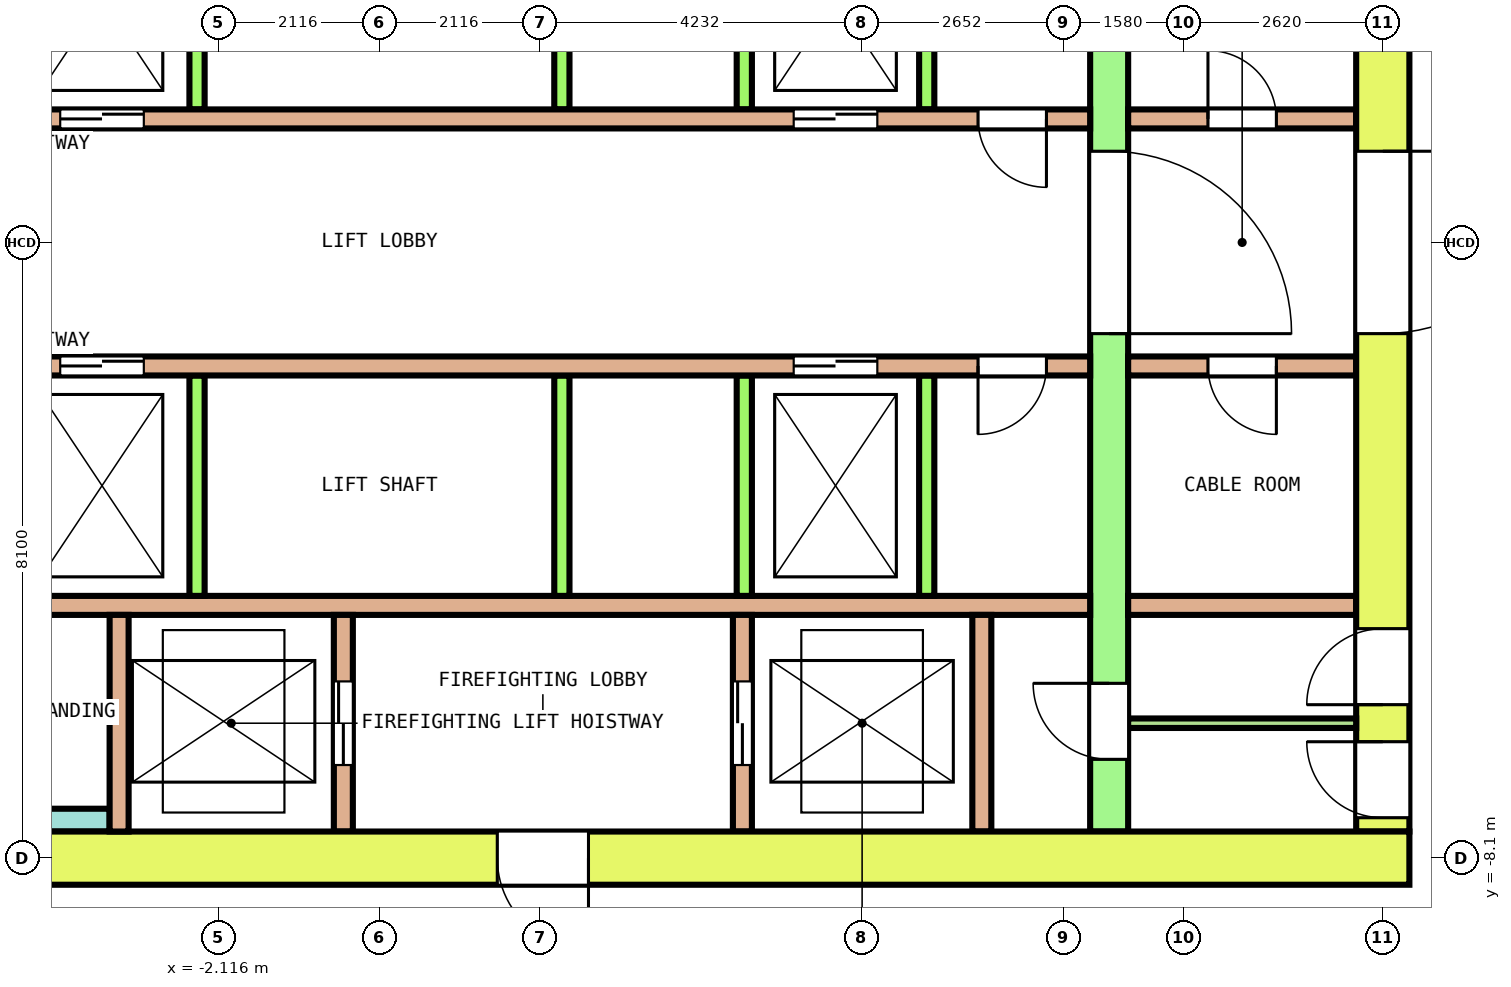
"""IFC4 building model, lengths in metres.
Left out: names, types, materials, properties, quantities, classifications, styles, units other than length and angle.
Written with IfcOpenShell. Run it as: python <this file> out.ifc"""

import sys

from ifc_helpers import new_model, si_unit, direction, frame, frame_2d, origin, place, context, subcontext, project, spatial, rectangle, extrude, element, fill, save


model = new_model("IFC4")
c1 = context("Model", 3, precision=1e-05, world=origin(), true_north=direction((0.0, 1.0)))
c2 = subcontext(c1, "Body", "Model", "MODEL_VIEW")
j1 = project(units=[si_unit("LENGTHUNIT", "METRE"), si_unit("PLANEANGLEUNIT", "RADIAN")], contexts=[c1])
p1 = place(None, origin())
s1 = spatial("IfcSite", under=j1, at=p1, CompositionType="ELEMENT")
p2 = place(p1, origin())
s2 = spatial("IfcBuilding", under=s1, at=p2, CompositionType="ELEMENT")
p3 = place(p2, frame((0.0, 0.0, 193.6)))
s3 = spatial("IfcBuildingStorey", under=s2, at=p3, CompositionType="ELEMENT", Elevation=193.6)
p4 = place(p3, frame((-13.55, -8.1, 0.0), z_axis=(0.0, 0.0, 1.0), x_axis=(1.0, 0.0, 0.0)))
e1 = element("IfcWall", 1, at=p4, inside=s3, PredefinedType="SHEAR", context=c2, shape_type="SweptSolid", body=[
    extrude(rectangle(XDim=27.1, YDim=0.7, at=frame_2d((13.55, 0.0))), origin(), (0.0, 0.0, 1.0), 4.1),
])
p5 = place(p4, frame((15.1, 0.0, 0.0)))
e2 = element("IfcOpeningElement", 2, at=p5, cuts=e1, PredefinedType="OPENING", context=c2, shape_type="SweptSolid", body=[
    extrude(rectangle(XDim=1.2, YDim=2.1, at=frame_2d((0.6, 1.05))), frame((0.0, 0.36, 0.0), z_axis=(0.0, -1.0, 0.0), x_axis=(1.0, 0.0, 0.0)), (0.0, 0.0, 1.0), 0.72),
])
p6 = place(p3, frame((13.2, -7.75, 0.0), z_axis=(0.0, 0.0, 1.0), x_axis=(0.0, 1.0, 0.0)))
e3 = element("IfcWall", 3, at=p6, inside=s3, PredefinedType="SHEAR", context=c2, shape_type="SweptSolid", body=[
    extrude(rectangle(XDim=15.5, YDim=0.7, at=frame_2d((7.75, 0.0))), origin(), (0.0, 0.0, 1.0), 4.1),
])
p7 = place(p6, frame((6.55, 0.0, 0.0)))
e4 = element("IfcOpeningElement", 4, at=p7, cuts=e3, PredefinedType="OPENING", context=c2, shape_type="SweptSolid", body=[
    extrude(rectangle(XDim=2.4, YDim=2.1, at=frame_2d((1.2, 1.05))), frame((0.0, 0.36, 0.0), z_axis=(0.0, -1.0, 0.0), x_axis=(1.0, 0.0, 0.0)), (0.0, 0.0, 1.0), 0.72),
])
p8 = place(p6, frame((13.45, 0.0, 0.0)))
e5 = element("IfcOpeningElement", 5, at=p8, cuts=e3, PredefinedType="OPENING", context=c2, shape_type="SweptSolid", body=[
    extrude(rectangle(XDim=1.2, YDim=2.1, at=frame_2d((0.6, 1.05))), frame((0.0, 0.36, 0.0), z_axis=(0.0, -1.0, 0.0), x_axis=(1.0, 0.0, 0.0)), (0.0, 0.0, 1.0), 0.72),
])
p9 = place(p6, frame((0.181, 0.0, 0.0)))
e6 = element("IfcOpeningElement", 6, at=p9, cuts=e3, PredefinedType="OPENING", context=c2, shape_type="SweptSolid", body=[
    extrude(rectangle(XDim=1.0, YDim=2.1, at=frame_2d((0.5, 1.05))), frame((0.0, 0.36, 0.0), z_axis=(0.0, -1.0, 0.0), x_axis=(1.0, 0.0, 0.0)), (0.0, 0.0, 1.0), 0.72),
])
p10 = place(p6, frame((1.669, 0.0, 0.0)))
e7 = element("IfcOpeningElement", 7, at=p10, cuts=e3, PredefinedType="OPENING", context=c2, shape_type="SweptSolid", body=[
    extrude(rectangle(XDim=1.0, YDim=2.1, at=frame_2d((0.5, 1.05))), frame((0.0, 0.36, 0.0), z_axis=(0.0, -1.0, 0.0), x_axis=(1.0, 0.0, 0.0)), (0.0, 0.0, 1.0), 0.72),
])
p11 = place(p3, frame((9.6, -7.75, 0.0), z_axis=(0.0, 0.0, 1.0), x_axis=(0.0, 1.0, 0.0)))
e8 = element("IfcWall", 8, at=p11, inside=s3, PredefinedType="SHEAR", context=c2, shape_type="SweptSolid", body=[
    extrude(rectangle(XDim=15.5, YDim=0.5, at=frame_2d((7.75, 0.0))), origin(), (0.0, 0.0, 1.0), 4.1),
])
p12 = place(p11, frame((6.55, 0.0, 0.0)))
e9 = element("IfcOpeningElement", 9, at=p12, cuts=e8, PredefinedType="OPENING", context=c2, shape_type="SweptSolid", body=[
    extrude(rectangle(XDim=2.4, YDim=2.1, at=frame_2d((1.2, 1.05))), frame((0.0, 0.26, 0.0), z_axis=(0.0, -1.0, 0.0), x_axis=(1.0, 0.0, 0.0)), (0.0, 0.0, 1.0), 0.52),
])
p13 = place(p11, frame((13.45, 0.0, 0.0)))
e10 = element("IfcOpeningElement", 10, at=p13, cuts=e8, PredefinedType="OPENING", context=c2, shape_type="SweptSolid", body=[
    extrude(rectangle(XDim=1.2, YDim=2.1, at=frame_2d((0.6, 1.05))), frame((0.0, 0.26, 0.0), z_axis=(0.0, -1.0, 0.0), x_axis=(1.0, 0.0, 0.0)), (0.0, 0.0, 1.0), 0.52),
])
p14 = place(p11, frame((0.95, 0.0, 0.0)))
e11 = element("IfcOpeningElement", 11, at=p14, cuts=e8, PredefinedType="OPENING", context=c2, shape_type="SweptSolid", body=[
    extrude(rectangle(XDim=1.0, YDim=2.1, at=frame_2d((0.5, 1.05))), frame((0.0, 0.26, 0.0), z_axis=(0.0, -1.0, 0.0), x_axis=(1.0, 0.0, 0.0)), (0.0, 0.0, 1.0), 0.52),
])
p15 = place(p3, frame((-9.35, 1.625, 0.0), z_axis=(0.0, 0.0, 1.0), x_axis=(1.0, 0.0, 0.0)))
e12 = element("IfcWall", 12, at=p15, inside=s3, PredefinedType="SOLIDWALL", context=c2, shape_type="SweptSolid", body=[
    extrude(rectangle(XDim=18.7, YDim=0.25, at=frame_2d((9.35, 0.0))), origin(), (0.0, 0.0, 1.0), 4.1),
])
p16 = place(p15, frame((2.85, 0.0, 0.0)))
e13 = element("IfcOpeningElement", 13, at=p16, cuts=e12, PredefinedType="OPENING", context=c2, shape_type="SweptSolid", body=[
    extrude(rectangle(XDim=1.1, YDim=2.1, at=frame_2d((0.55, 1.05))), frame((0.0, 0.135, 0.0), z_axis=(0.0, -1.0, 0.0), x_axis=(1.0, 0.0, 0.0)), (0.0, 0.0, 1.0), 0.27),
])
p17 = place(p15, frame((5.15, 0.0, 0.0)))
e14 = element("IfcOpeningElement", 14, at=p17, cuts=e12, PredefinedType="OPENING", context=c2, shape_type="SweptSolid", body=[
    extrude(rectangle(XDim=1.1, YDim=2.1, at=frame_2d((0.55, 1.05))), frame((0.0, 0.135, 0.0), z_axis=(0.0, -1.0, 0.0), x_axis=(1.0, 0.0, 0.0)), (0.0, 0.0, 1.0), 0.27),
])
p18 = place(p15, frame((14.8, 0.0, 0.0)))
e15 = element("IfcOpeningElement", 15, at=p18, cuts=e12, PredefinedType="OPENING", context=c2, shape_type="SweptSolid", body=[
    extrude(rectangle(XDim=1.1, YDim=2.1, at=frame_2d((0.55, 1.05))), frame((0.0, 0.135, 0.0), z_axis=(0.0, -1.0, 0.0), x_axis=(1.0, 0.0, 0.0)), (0.0, 0.0, 1.0), 0.27),
])
p19 = place(p15, frame((0.575, 0.0, 0.0)))
e16 = element("IfcOpeningElement", 16, at=p19, cuts=e12, PredefinedType="OPENING", context=c2, shape_type="SweptSolid", body=[
    extrude(rectangle(XDim=0.9, YDim=2.1, at=frame_2d((0.45, 1.05))), frame((0.0, 0.135, 0.0), z_axis=(0.0, -1.0, 0.0), x_axis=(1.0, 0.0, 0.0)), (0.0, 0.0, 1.0), 0.27),
])
p20 = place(p15, frame((17.225, 0.0, 0.0)))
e17 = element("IfcOpeningElement", 17, at=p20, cuts=e12, PredefinedType="OPENING", context=c2, shape_type="SweptSolid", body=[
    extrude(rectangle(XDim=0.9, YDim=2.1, at=frame_2d((0.45, 1.05))), frame((0.0, 0.135, 0.0), z_axis=(0.0, -1.0, 0.0), x_axis=(1.0, 0.0, 0.0)), (0.0, 0.0, 1.0), 0.27),
])
p21 = place(p3, frame((9.85, 1.625, 0.0), z_axis=(0.0, 0.0, 1.0), x_axis=(1.0, 0.0, 0.0)))
e18 = element("IfcWall", 18, at=p21, inside=s3, PredefinedType="SOLIDWALL", context=c2, shape_type="SweptSolid", body=[
    extrude(rectangle(XDim=3.0, YDim=0.25, at=frame_2d((1.5, 0.0))), origin(), (0.0, 0.0, 1.0), 4.1),
])
p22 = place(p21, frame((1.05, 0.0, 0.0)))
e19 = element("IfcOpeningElement", 19, at=p22, cuts=e18, PredefinedType="OPENING", context=c2, shape_type="SweptSolid", body=[
    extrude(rectangle(XDim=0.9, YDim=2.1, at=frame_2d((0.45, 1.05))), frame((0.0, 0.135, 0.0), z_axis=(0.0, -1.0, 0.0), x_axis=(1.0, 0.0, 0.0)), (0.0, 0.0, 1.0), 0.27),
])
for number, where, z_axis, x_axis in (
    (20, (-2.4, 1.75, 0.0), (0.0, 0.0, 1.0), (0.0, 1.0, 0.0)),
    (21, (2.4, 1.75, 0.0), (0.0, 0.0, 1.0), (0.0, 1.0, 0.0)),
    (22, (4.8, 1.75, 0.0), (0.0, 0.0, 1.0), (0.0, 1.0, 0.0)),
    (23, (7.2, 1.75, 0.0), (0.0, 0.0, 1.0), (0.0, 1.0, 0.0)),
):
    element("IfcWall", number, at=place(p3, frame(where, z_axis=z_axis, x_axis=x_axis)), inside=s3, PredefinedType="SOLIDWALL", context=c2, shape_type="SweptSolid", body=[
        extrude(rectangle(XDim=2.9, YDim=0.2, at=frame_2d((1.45, 0.0))), origin(), (0.0, 0.0, 1.0), 4.1),
    ])
p23 = place(p3, frame((-9.35, -1.625, 0.0), z_axis=(0.0, 0.0, 1.0), x_axis=(1.0, 0.0, 0.0)))
e24 = element("IfcWall", 24, at=p23, inside=s3, PredefinedType="SOLIDWALL", context=c2, shape_type="SweptSolid", body=[
    extrude(rectangle(XDim=18.7, YDim=0.25, at=frame_2d((9.35, 0.0))), origin(), (0.0, 0.0, 1.0), 4.1),
])
p24 = place(p23, frame((2.85, 0.0, 0.0)))
e25 = element("IfcOpeningElement", 25, at=p24, cuts=e24, PredefinedType="OPENING", context=c2, shape_type="SweptSolid", body=[
    extrude(rectangle(XDim=1.1, YDim=2.1, at=frame_2d((0.55, 1.05))), frame((0.0, 0.135, 0.0), z_axis=(0.0, -1.0, 0.0), x_axis=(1.0, 0.0, 0.0)), (0.0, 0.0, 1.0), 0.27),
])
p25 = place(p23, frame((5.15, 0.0, 0.0)))
e26 = element("IfcOpeningElement", 26, at=p25, cuts=e24, PredefinedType="OPENING", context=c2, shape_type="SweptSolid", body=[
    extrude(rectangle(XDim=1.1, YDim=2.1, at=frame_2d((0.55, 1.05))), frame((0.0, 0.135, 0.0), z_axis=(0.0, -1.0, 0.0), x_axis=(1.0, 0.0, 0.0)), (0.0, 0.0, 1.0), 0.27),
])
p26 = place(p23, frame((14.8, 0.0, 0.0)))
e27 = element("IfcOpeningElement", 27, at=p26, cuts=e24, PredefinedType="OPENING", context=c2, shape_type="SweptSolid", body=[
    extrude(rectangle(XDim=1.1, YDim=2.1, at=frame_2d((0.55, 1.05))), frame((0.0, 0.135, 0.0), z_axis=(0.0, -1.0, 0.0), x_axis=(1.0, 0.0, 0.0)), (0.0, 0.0, 1.0), 0.27),
])
p27 = place(p23, frame((0.575, 0.0, 0.0)))
e28 = element("IfcOpeningElement", 28, at=p27, cuts=e24, PredefinedType="OPENING", context=c2, shape_type="SweptSolid", body=[
    extrude(rectangle(XDim=0.9, YDim=2.1, at=frame_2d((0.45, 1.05))), frame((0.0, 0.135, 0.0), z_axis=(0.0, -1.0, 0.0), x_axis=(1.0, 0.0, 0.0)), (0.0, 0.0, 1.0), 0.27),
])
p28 = place(p23, frame((17.225, 0.0, 0.0)))
e29 = element("IfcOpeningElement", 29, at=p28, cuts=e24, PredefinedType="OPENING", context=c2, shape_type="SweptSolid", body=[
    extrude(rectangle(XDim=0.9, YDim=2.1, at=frame_2d((0.45, 1.05))), frame((0.0, 0.135, 0.0), z_axis=(0.0, -1.0, 0.0), x_axis=(1.0, 0.0, 0.0)), (0.0, 0.0, 1.0), 0.27),
])
p29 = place(p3, frame((9.85, -1.625, 0.0), z_axis=(0.0, 0.0, 1.0), x_axis=(1.0, 0.0, 0.0)))
e30 = element("IfcWall", 30, at=p29, inside=s3, PredefinedType="SOLIDWALL", context=c2, shape_type="SweptSolid", body=[
    extrude(rectangle(XDim=3.0, YDim=0.25, at=frame_2d((1.5, 0.0))), origin(), (0.0, 0.0, 1.0), 4.1),
])
p30 = place(p29, frame((1.05, 0.0, 0.0)))
e31 = element("IfcOpeningElement", 31, at=p30, cuts=e30, PredefinedType="OPENING", context=c2, shape_type="SweptSolid", body=[
    extrude(rectangle(XDim=0.9, YDim=2.1, at=frame_2d((0.45, 1.05))), frame((0.0, 0.135, 0.0), z_axis=(0.0, -1.0, 0.0), x_axis=(1.0, 0.0, 0.0)), (0.0, 0.0, 1.0), 0.27),
])
p31 = place(p3, frame((-9.35, -4.775, 0.0), z_axis=(0.0, 0.0, 1.0), x_axis=(1.0, 0.0, 0.0)))
e32 = element("IfcWall", 32, at=p31, inside=s3, PredefinedType="SOLIDWALL", context=c2, shape_type="SweptSolid", body=[
    extrude(rectangle(XDim=18.7, YDim=0.25, at=frame_2d((9.35, 0.0))), origin(), (0.0, 0.0, 1.0), 4.1),
])
p32 = place(p3, frame((9.85, -4.775, 0.0), z_axis=(0.0, 0.0, 1.0), x_axis=(1.0, 0.0, 0.0)))
e33 = element("IfcWall", 33, at=p32, inside=s3, PredefinedType="SOLIDWALL", context=c2, shape_type="SweptSolid", body=[
    extrude(rectangle(XDim=3.0, YDim=0.25, at=frame_2d((1.5, 0.0))), origin(), (0.0, 0.0, 1.0), 4.1),
])
for number, where, z_axis, x_axis in (
    (34, (-2.4, -4.65, 0.0), (0.0, 0.0, 1.0), (0.0, 1.0, 0.0)),
    (35, (2.4, -4.65, 0.0), (0.0, 0.0, 1.0), (0.0, 1.0, 0.0)),
    (36, (4.8, -4.65, 0.0), (0.0, 0.0, 1.0), (0.0, 1.0, 0.0)),
    (37, (7.2, -4.65, 0.0), (0.0, 0.0, 1.0), (0.0, 1.0, 0.0)),
):
    element("IfcWall", number, at=place(p3, frame(where, z_axis=z_axis, x_axis=x_axis)), inside=s3, PredefinedType="SOLIDWALL", context=c2, shape_type="SweptSolid", body=[
        extrude(rectangle(XDim=2.9, YDim=0.2, at=frame_2d((1.45, 0.0))), origin(), (0.0, 0.0, 1.0), 4.1),
    ])
p33 = place(p3, frame((-9.35, -7.6, 0.0), z_axis=(0.0, 0.0, 1.0), x_axis=(1.0, 0.0, 0.0)))
e38 = element("IfcWall", 38, at=p33, inside=s3, PredefinedType="SOLIDWALL", context=c2, shape_type="SweptSolid", body=[
    extrude(rectangle(XDim=5.8, YDim=0.3, at=frame_2d((2.9, 0.0))), origin(), (0.0, 0.0, 1.0), 4.1),
])
p34 = place(p3, frame((-3.425, -7.75, 0.0), z_axis=(0.0, 0.0, 1.0), x_axis=(0.0, 1.0, 0.0)))
e39 = element("IfcWall", 39, at=p34, inside=s3, PredefinedType="SOLIDWALL", context=c2, shape_type="SweptSolid", body=[
    extrude(rectangle(XDim=2.85, YDim=0.25, at=frame_2d((1.425, 0.0))), origin(), (0.0, 0.0, 1.0), 4.1),
])
p35 = place(p3, frame((-0.475, -7.75, 0.0), z_axis=(0.0, 0.0, 1.0), x_axis=(0.0, 1.0, 0.0)))
e40 = element("IfcWall", 40, at=p35, inside=s3, PredefinedType="SOLIDWALL", context=c2, shape_type="SweptSolid", body=[
    extrude(rectangle(XDim=2.85, YDim=0.25, at=frame_2d((1.425, 0.0))), origin(), (0.0, 0.0, 1.0), 4.1),
])
p36 = place(p35, frame((0.875, 0.0, 0.0)))
e41 = element("IfcOpeningElement", 41, at=p36, cuts=e40, PredefinedType="OPENING", context=c2, shape_type="SweptSolid", body=[
    extrude(rectangle(XDim=1.1, YDim=2.1, at=frame_2d((0.55, 1.05))), frame((0.0, 0.135, 0.0), z_axis=(0.0, -1.0, 0.0), x_axis=(1.0, 0.0, 0.0)), (0.0, 0.0, 1.0), 0.27),
])
p37 = place(p3, frame((4.775, -7.75, 0.0), z_axis=(0.0, 0.0, 1.0), x_axis=(0.0, 1.0, 0.0)))
e42 = element("IfcWall", 42, at=p37, inside=s3, PredefinedType="SOLIDWALL", context=c2, shape_type="SweptSolid", body=[
    extrude(rectangle(XDim=2.85, YDim=0.25, at=frame_2d((1.425, 0.0))), origin(), (0.0, 0.0, 1.0), 4.1),
])
p38 = place(p37, frame((0.875, 0.0, 0.0)))
e43 = element("IfcOpeningElement", 43, at=p38, cuts=e42, PredefinedType="OPENING", context=c2, shape_type="SweptSolid", body=[
    extrude(rectangle(XDim=1.1, YDim=2.1, at=frame_2d((0.55, 1.05))), frame((0.0, 0.135, 0.0), z_axis=(0.0, -1.0, 0.0), x_axis=(1.0, 0.0, 0.0)), (0.0, 0.0, 1.0), 0.27),
])
p39 = place(p3, frame((7.925, -7.75, 0.0), z_axis=(0.0, 0.0, 1.0), x_axis=(0.0, 1.0, 0.0)))
e44 = element("IfcWall", 44, at=p39, inside=s3, PredefinedType="SOLIDWALL", context=c2, shape_type="SweptSolid", body=[
    extrude(rectangle(XDim=2.85, YDim=0.25, at=frame_2d((1.425, 0.0))), origin(), (0.0, 0.0, 1.0), 4.1),
])
p40 = place(p3, frame((9.85, -6.325, 0.0), z_axis=(0.0, 0.0, 1.0), x_axis=(1.0, 0.0, 0.0)))
e45 = element("IfcWall", 45, at=p40, inside=s3, PredefinedType="PARTITIONING", context=c2, shape_type="SweptSolid", body=[
    extrude(rectangle(XDim=3.0, YDim=0.125, at=frame_2d((1.5, 0.0))), origin(), (0.0, 0.0, 1.0), 4.1),
])
p41 = place(p17, origin())
e46 = element("IfcDoor", 46, at=p41, inside=s3, OperationType="DOUBLE_DOOR_SLIDING", PredefinedType="DOOR", context=c2, shape_type="SweptSolid", body=[
    extrude(rectangle(XDim=1.1, YDim=2.1, at=frame_2d((0.55, 1.05))), frame((0.0, 0.075, 0.0), z_axis=(0.0, -1.0, 0.0), x_axis=(1.0, 0.0, 0.0)), (0.0, 0.0, 1.0), 0.15),
])
fill(e14, e46)
p42 = place(p18, origin())
e47 = element("IfcDoor", 47, at=p42, inside=s3, OperationType="DOUBLE_DOOR_SLIDING", PredefinedType="DOOR", context=c2, shape_type="SweptSolid", body=[
    extrude(rectangle(XDim=1.1, YDim=2.1, at=frame_2d((0.55, 1.05))), frame((0.0, 0.075, 0.0), z_axis=(0.0, -1.0, 0.0), x_axis=(1.0, 0.0, 0.0)), (0.0, 0.0, 1.0), 0.15),
])
fill(e15, e47)
p43 = place(p25, origin())
e48 = element("IfcDoor", 48, at=p43, inside=s3, OperationType="DOUBLE_DOOR_SLIDING", PredefinedType="DOOR", context=c2, shape_type="SweptSolid", body=[
    extrude(rectangle(XDim=1.1, YDim=2.1, at=frame_2d((0.55, 1.05))), frame((0.0, 0.075, 0.0), z_axis=(0.0, -1.0, 0.0), x_axis=(1.0, 0.0, 0.0)), (0.0, 0.0, 1.0), 0.15),
])
fill(e26, e48)
p44 = place(p26, origin())
e49 = element("IfcDoor", 49, at=p44, inside=s3, OperationType="DOUBLE_DOOR_SLIDING", PredefinedType="DOOR", context=c2, shape_type="SweptSolid", body=[
    extrude(rectangle(XDim=1.1, YDim=2.1, at=frame_2d((0.55, 1.05))), frame((0.0, 0.075, 0.0), z_axis=(0.0, -1.0, 0.0), x_axis=(1.0, 0.0, 0.0)), (0.0, 0.0, 1.0), 0.15),
])
fill(e27, e49)
p45 = place(p36, origin())
e50 = element("IfcDoor", 50, at=p45, inside=s3, OperationType="DOUBLE_DOOR_SLIDING", PredefinedType="DOOR", context=c2, shape_type="SweptSolid", body=[
    extrude(rectangle(XDim=1.1, YDim=2.1, at=frame_2d((0.55, 1.05))), frame((0.0, 0.075, 0.0), z_axis=(0.0, -1.0, 0.0), x_axis=(1.0, 0.0, 0.0)), (0.0, 0.0, 1.0), 0.15),
])
fill(e41, e50)
p46 = place(p38, origin())
e51 = element("IfcDoor", 51, at=p46, inside=s3, OperationType="DOUBLE_DOOR_SLIDING", PredefinedType="DOOR", context=c2, shape_type="SweptSolid", body=[
    extrude(rectangle(XDim=1.1, YDim=2.1, at=frame_2d((0.55, 1.05))), frame((0.0, 0.075, 0.0), z_axis=(0.0, -1.0, 0.0), x_axis=(1.0, 0.0, 0.0)), (0.0, 0.0, 1.0), 0.15),
])
fill(e43, e51)
p47 = place(p12, origin())
e52 = element("IfcDoor", 52, at=p47, inside=s3, OperationType="DOUBLE_DOOR_SINGLE_SWING", PredefinedType="DOOR", context=c2, shape_type="SweptSolid", body=[
    extrude(rectangle(XDim=2.4, YDim=2.1, at=frame_2d((1.2, 1.05))), frame((0.0, 0.2, 0.0), z_axis=(0.0, -1.0, 0.0), x_axis=(1.0, 0.0, 0.0)), (0.0, 0.0, 1.0), 0.4),
])
fill(e9, e52)
p48 = place(p7, origin())
e53 = element("IfcDoor", 53, at=p48, inside=s3, OperationType="DOUBLE_DOOR_SINGLE_SWING", PredefinedType="DOOR", context=c2, shape_type="SweptSolid", body=[
    extrude(rectangle(XDim=2.4, YDim=2.1, at=frame_2d((1.2, 1.05))), frame((0.0, 0.3, 0.0), z_axis=(0.0, -1.0, 0.0), x_axis=(1.0, 0.0, 0.0)), (0.0, 0.0, 1.0), 0.6),
])
fill(e4, e53)
p49 = place(p5, origin())
e54 = element("IfcDoor", 54, at=p49, inside=s3, OperationType="SINGLE_SWING_LEFT", PredefinedType="DOOR", context=c2, shape_type="SweptSolid", body=[
    extrude(rectangle(XDim=1.2, YDim=2.1, at=frame_2d((0.6, 1.05))), frame((0.0, 0.3, 0.0), z_axis=(0.0, -1.0, 0.0), x_axis=(1.0, 0.0, 0.0)), (0.0, 0.0, 1.0), 0.6),
])
fill(e2, e54)
p50 = place(p14, origin())
e55 = element("IfcDoor", 55, at=p50, inside=s3, OperationType="SINGLE_SWING_LEFT", PredefinedType="DOOR", context=c2, shape_type="SweptSolid", body=[
    extrude(rectangle(XDim=1.0, YDim=2.1, at=frame_2d((0.5, 1.05))), frame((0.0, 0.2, 0.0), z_axis=(0.0, -1.0, 0.0), x_axis=(1.0, 0.0, 0.0)), (0.0, 0.0, 1.0), 0.4),
])
fill(e11, e55)
p51 = place(p9, origin())
e56 = element("IfcDoor", 56, at=p51, inside=s3, OperationType="SINGLE_SWING_RIGHT", PredefinedType="DOOR", context=c2, shape_type="SweptSolid", body=[
    extrude(rectangle(XDim=1.0, YDim=2.1, at=frame_2d((0.5, 1.05))), frame((0.0, 0.3, 0.0), z_axis=(0.0, -1.0, 0.0), x_axis=(1.0, 0.0, 0.0)), (0.0, 0.0, 1.0), 0.6),
])
fill(e6, e56)
p52 = place(p10, origin())
e57 = element("IfcDoor", 57, at=p52, inside=s3, OperationType="SINGLE_SWING_LEFT", PredefinedType="DOOR", context=c2, shape_type="SweptSolid", body=[
    extrude(rectangle(XDim=1.0, YDim=2.1, at=frame_2d((0.5, 1.05))), frame((0.0, 0.3, 0.0), z_axis=(0.0, -1.0, 0.0), x_axis=(1.0, 0.0, 0.0)), (0.0, 0.0, 1.0), 0.6),
])
fill(e7, e57)
p53 = place(p20, origin())
e58 = element("IfcDoor", 58, at=p53, inside=s3, OperationType="SINGLE_SWING_LEFT", PredefinedType="DOOR", context=c2, shape_type="SweptSolid", body=[
    extrude(rectangle(XDim=0.9, YDim=2.1, at=frame_2d((0.45, 1.05))), frame((0.0, 0.075, 0.0), z_axis=(0.0, -1.0, 0.0), x_axis=(1.0, 0.0, 0.0)), (0.0, 0.0, 1.0), 0.15),
])
fill(e17, e58)
p54 = place(p22, origin())
e59 = element("IfcDoor", 59, at=p54, inside=s3, OperationType="SINGLE_SWING_RIGHT", PredefinedType="DOOR", context=c2, shape_type="SweptSolid", body=[
    extrude(rectangle(XDim=0.9, YDim=2.1, at=frame_2d((0.45, 1.05))), frame((0.0, 0.075, 0.0), z_axis=(0.0, -1.0, 0.0), x_axis=(1.0, 0.0, 0.0)), (0.0, 0.0, 1.0), 0.15),
])
fill(e19, e59)
p55 = place(p28, origin())
e60 = element("IfcDoor", 60, at=p55, inside=s3, OperationType="SINGLE_SWING_RIGHT", PredefinedType="DOOR", context=c2, shape_type="SweptSolid", body=[
    extrude(rectangle(XDim=0.9, YDim=2.1, at=frame_2d((0.45, 1.05))), frame((0.0, 0.075, 0.0), z_axis=(0.0, -1.0, 0.0), x_axis=(1.0, 0.0, 0.0)), (0.0, 0.0, 1.0), 0.15),
])
fill(e29, e60)
p56 = place(p30, origin())
e61 = element("IfcDoor", 61, at=p56, inside=s3, OperationType="SINGLE_SWING_LEFT", PredefinedType="DOOR", context=c2, shape_type="SweptSolid", body=[
    extrude(rectangle(XDim=0.9, YDim=2.1, at=frame_2d((0.45, 1.05))), frame((0.0, 0.075, 0.0), z_axis=(0.0, -1.0, 0.0), x_axis=(1.0, 0.0, 0.0)), (0.0, 0.0, 1.0), 0.15),
])
fill(e31, e61)
save(model, sys.argv[1])
